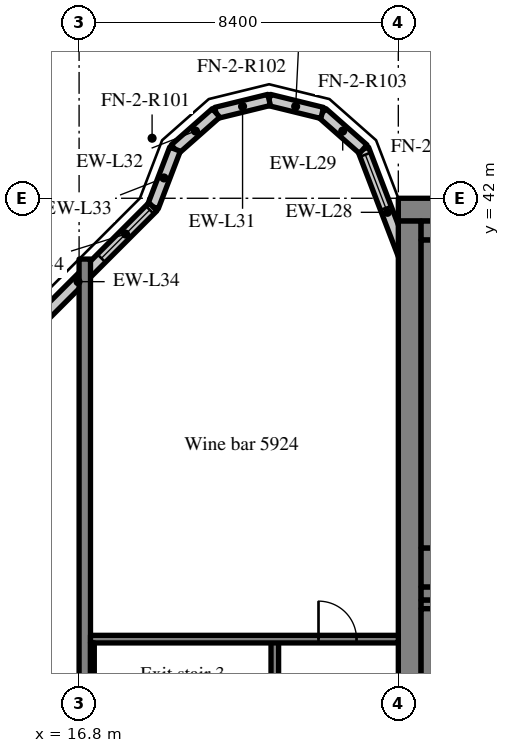
"""IFC4 building model, lengths in metres.
Left out: names, types, materials, properties, quantities, classifications, styles, units other than length and angle.
Written with IfcOpenShell. Run it as: python <this file> out.ifc"""

import sys

from ifc_helpers import new_model, si_unit, direction, frame, frame_2d, origin, place, context, subcontext, project, spatial, rectangle, extrude, source, transform, mapped, element, fill, save


model = new_model("IFC4")
c1 = context("Model", 3, precision=1e-05, world=origin(), true_north=direction((0.0, 1.0)))
c2 = subcontext(c1, "Body", "Model", "MODEL_VIEW")
j1 = project(units=[si_unit("LENGTHUNIT", "METRE"), si_unit("PLANEANGLEUNIT", "RADIAN")], contexts=[c1])
p1 = place(None, origin())
s1 = spatial("IfcSite", under=j1, at=p1, CompositionType="ELEMENT")
p2 = place(p1, origin())
s2 = spatial("IfcBuilding", under=s1, at=p2, CompositionType="ELEMENT")
p3 = place(p2, frame((0.0, 0.0, 245.2)))
s3 = spatial("IfcBuildingStorey", under=s2, at=p3, CompositionType="ELEMENT", Elevation=245.2)
m1 = source(origin(), c2, "Body", "SweptSolid", [
    extrude(rectangle(XDim=50.4, YDim=0.6, at=frame_2d((25.2, 0.0))), origin(), (0.0, 0.0, 1.0), 3.62),
])
p4 = place(p3, frame((25.2, 41.7, 0.0), z_axis=(0.0, 0.0, 1.0), x_axis=(1.0, 0.0, 0.0)))
e1 = element("IfcWall", 1, at=p4, inside=s3, PredefinedType="SHEAR", context=c2, shape_type="MappedRepresentation", body=[
    mapped(m1, transform((0.0, 0.0, 0.0), scale=1.0)),
])
m2 = source(origin(), c2, "Body", "SweptSolid", [
    extrude(rectangle(XDim=18.8, YDim=0.6, at=frame_2d((9.4, 0.0))), origin(), (0.0, 0.0, 1.0), 3.62),
])
p5 = place(p3, frame((25.5, 22.6, 0.0), z_axis=(0.0, 0.0, 1.0), x_axis=(0.0, 1.0, 0.0)))
e2 = element("IfcWall", 2, at=p5, inside=s3, PredefinedType="SHEAR", context=c2, shape_type="MappedRepresentation", body=[
    mapped(m2, transform((0.0, 0.0, 0.0), scale=1.0)),
])
m3 = source(origin(), c2, "Body", "SweptSolid", [
    extrude(rectangle(XDim=7.625, YDim=0.35, at=frame_2d((3.812, 0.0))), origin(), (0.0, 0.0, 1.0), 3.62),
])
p6 = place(p3, frame((25.8, 31.6, 0.0), z_axis=(0.0, 0.0, 1.0), x_axis=(1.0, 0.0, 0.0)))
e3 = element("IfcWall", 3, at=p6, inside=s3, PredefinedType="SHEAR", context=c2, shape_type="MappedRepresentation", body=[
    mapped(m3, transform((0.0, 0.0, 0.0), scale=1.0)),
])
m4 = source(origin(), c2, "Body", "SweptSolid", [
    extrude(rectangle(XDim=1.1, YDim=2.1, at=frame_2d((0.55, 1.05))), frame((0.0, 0.185, 0.0), z_axis=(0.0, -1.0, 0.0), x_axis=(1.0, 0.0, 0.0)), (0.0, 0.0, 1.0), 0.37),
])
p7 = place(p6, frame((5.938, 0.0, 0.0)))
e4 = element("IfcOpeningElement", 4, at=p7, cuts=e3, PredefinedType="OPENING", context=c2, shape_type="MappedRepresentation", body=[
    mapped(m4, transform((0.0, 0.0, 0.0), scale=1.0)),
])
m5 = source(origin(), c2, "Body", "SweptSolid", [
    extrude(rectangle(XDim=18.4, YDim=0.3, at=frame_2d((9.2, 0.0))), origin(), (0.0, 0.0, 1.0), 3.62),
])
p8 = place(p3, frame((16.95, 22.0, 0.0), z_axis=(0.0, 0.0, 1.0), x_axis=(0.0, 1.0, 0.0)))
e5 = element("IfcWall", 5, at=p8, inside=s3, PredefinedType="SHEAR", context=c2, shape_type="MappedRepresentation", body=[
    mapped(m5, transform((0.0, 0.0, 0.0), scale=1.0)),
])
m6 = source(origin(), c2, "Body", "SweptSolid", [
    extrude(rectangle(XDim=3.559, YDim=0.3, at=frame_2d((1.78, 0.0))), origin(), (0.0, 0.0, 1.0), 3.62),
])
p9 = place(p3, frame((25.55, 39.969, 0.0), z_axis=(0.0, 0.0, 1.0), x_axis=(-0.35779745313, 0.933799219604, 0.0)))
e6 = element("IfcWall", 6, at=p9, inside=s3, PredefinedType="SOLIDWALL", context=c2, shape_type="MappedRepresentation", body=[
    mapped(m6, transform((0.0, 0.0, 0.0), scale=1.0)),
])
m7 = source(origin(), c2, "Body", "SweptSolid", [
    extrude(rectangle(XDim=1.5, YDim=2.0, at=frame_2d((0.75, 1.0))), frame((0.0, 0.16, 0.0), z_axis=(0.0, -1.0, 0.0), x_axis=(1.0, 0.0, 0.0)), (0.0, 0.0, 1.0), 0.32),
])
p10 = place(p9, frame((1.903, 0.0, 0.9)))
e7 = element("IfcOpeningElement", 7, at=p10, cuts=e6, PredefinedType="OPENING", context=c2, shape_type="MappedRepresentation", body=[
    mapped(m7, transform((0.0, 0.0, 0.0), scale=1.0)),
])
m8 = source(origin(), c2, "Body", "SweptSolid", [
    extrude(rectangle(XDim=1.44, YDim=0.3, at=frame_2d((0.72, 0.0))), origin(), (0.0, 0.0, 1.0), 3.62),
])
p11 = place(p3, frame((24.277, 43.292, 0.0), z_axis=(0.0, 0.0, 1.0), x_axis=(-0.749649827867, 0.661834673902, 0.0)))
e8 = element("IfcWall", 8, at=p11, inside=s3, PredefinedType="SOLIDWALL", context=c2, shape_type="MappedRepresentation", body=[
    mapped(m8, transform((0.0, 0.0, 0.0), scale=1.0)),
])
m9 = source(origin(), c2, "Body", "SweptSolid", [
    extrude(rectangle(XDim=1.438, YDim=0.3, at=frame_2d((0.719, 0.0))), origin(), (0.0, 0.0, 1.0), 3.62),
])
p12 = place(p3, frame((23.197, 44.245, 0.0), z_axis=(0.0, 0.0, 1.0), x_axis=(-0.971152283879, 0.238460146601, 0.0)))
e9 = element("IfcWall", 9, at=p12, inside=s3, PredefinedType="SOLIDWALL", context=c2, shape_type="MappedRepresentation", body=[
    mapped(m9, transform((0.0, 0.0, 0.0), scale=1.0)),
])
m10 = source(origin(), c2, "Body", "SweptSolid", [
    extrude(rectangle(XDim=1.439, YDim=0.3, at=frame_2d((0.719, 0.0))), origin(), (0.0, 0.0, 1.0), 3.62),
])
p13 = place(p3, frame((21.8, 44.588, 0.0), z_axis=(0.0, 0.0, 1.0), x_axis=(-0.971161932466, -0.238420848351, 0.0)))
e10 = element("IfcWall", 10, at=p13, inside=s3, PredefinedType="SOLIDWALL", context=c2, shape_type="MappedRepresentation", body=[
    mapped(m10, transform((0.0, 0.0, 0.0), scale=1.0)),
])
m11 = source(origin(), c2, "Body", "SweptSolid", [
    extrude(rectangle(XDim=1.44, YDim=0.3, at=frame_2d((0.72, 0.0))), origin(), (0.0, 0.0, 1.0), 3.62),
])
p14 = place(p3, frame((20.403, 44.245, 0.0), z_axis=(0.0, 0.0, 1.0), x_axis=(-0.74957555648, -0.661918790432, 0.0)))
e11 = element("IfcWall", 11, at=p14, inside=s3, PredefinedType="SOLIDWALL", context=c2, shape_type="MappedRepresentation", body=[
    mapped(m11, transform((0.0, 0.0, 0.0), scale=1.0)),
])
m12 = source(origin(), c2, "Body", "SweptSolid", [
    extrude(rectangle(XDim=1.622, YDim=0.3, at=frame_2d((0.811, 0.0))), origin(), (0.0, 0.0, 1.0), 3.62),
])
p15 = place(p3, frame((19.323, 43.292, 0.0), z_axis=(0.0, 0.0, 1.0), x_axis=(-0.357778527068, -0.933806471154, 0.0)))
e12 = element("IfcWall", 12, at=p15, inside=s3, PredefinedType="SOLIDWALL", context=c2, shape_type="MappedRepresentation", body=[
    mapped(m12, transform((0.0, 0.0, 0.0), scale=1.0)),
])
m13 = source(origin(), c2, "Body", "SweptSolid", [
    extrude(rectangle(XDim=5.576, YDim=0.3, at=frame_2d((2.788, 0.0))), origin(), (0.0, 0.0, 1.0), 3.62),
])
p16 = place(p3, frame((18.743, 41.777, 0.0), z_axis=(0.0, 0.0, 1.0), x_axis=(-0.707106781187, -0.707106781187, 0.0)))
e13 = element("IfcWall", 13, at=p16, inside=s3, PredefinedType="SOLIDWALL", context=c2, shape_type="MappedRepresentation", body=[
    mapped(m13, transform((0.0, 0.0, 0.0), scale=1.0)),
])
m14 = source(origin(), c2, "Body", "SweptSolid", [
    extrude(rectangle(XDim=1.8, YDim=1.5, at=frame_2d((0.9, 0.75))), frame((0.0, 0.16, 0.0), z_axis=(0.0, -1.0, 0.0), x_axis=(1.0, 0.0, 0.0)), (0.0, 0.0, 1.0), 0.32),
])
p17 = place(p16, frame((0.118, 0.0, 0.9)))
e14 = element("IfcOpeningElement", 14, at=p17, cuts=e13, PredefinedType="OPENING", context=c2, shape_type="MappedRepresentation", body=[
    mapped(m14, transform((0.0, 0.0, 0.0), scale=1.0)),
])
m15 = source(origin(), c2, "Body", "SweptSolid", [
    extrude(rectangle(XDim=8.3, YDim=0.2, at=frame_2d((4.15, 0.0))), origin(), (0.0, 0.0, 1.0), 3.62),
])
p18 = place(p3, frame((21.95, 22.1, 0.0), z_axis=(0.0, 0.0, 1.0), x_axis=(0.0, 1.0, 0.0)))
e15 = element("IfcWall", 15, at=p18, inside=s3, PredefinedType="SOLIDWALL", context=c2, shape_type="MappedRepresentation", body=[
    mapped(m15, transform((0.0, 0.0, 0.0), scale=1.0)),
])
m16 = source(origin(), c2, "Body", "SweptSolid", [
    extrude(rectangle(XDim=1.2, YDim=2.1, at=frame_2d((0.6, 1.05))), frame((0.0, 0.11, 0.0), z_axis=(0.0, -1.0, 0.0), x_axis=(1.0, 0.0, 0.0)), (0.0, 0.0, 1.0), 0.22),
])
p19 = place(p18, frame((0.6, 0.0, 0.0)))
e16 = element("IfcOpeningElement", 16, at=p19, cuts=e15, PredefinedType="OPENING", context=c2, shape_type="MappedRepresentation", body=[
    mapped(m16, transform((0.0, 0.0, 0.0), scale=1.0)),
])
m17 = source(origin(), c2, "Body", "SweptSolid", [
    extrude(rectangle(XDim=8.1, YDim=0.2, at=frame_2d((4.05, 0.0))), origin(), (0.0, 0.0, 1.0), 3.62),
])
p20 = place(p3, frame((17.1, 30.4, 0.0), z_axis=(0.0, 0.0, 1.0), x_axis=(1.0, 0.0, 0.0)))
e17 = element("IfcWall", 17, at=p20, inside=s3, PredefinedType="SOLIDWALL", context=c2, shape_type="MappedRepresentation", body=[
    mapped(m17, transform((0.0, 0.0, 0.0), scale=1.0)),
])
m18 = source(origin(), c2, "Body", "SweptSolid", [
    extrude(rectangle(XDim=1.0, YDim=2.1, at=frame_2d((0.5, 1.05))), frame((0.0, 0.11, 0.0), z_axis=(0.0, -1.0, 0.0), x_axis=(1.0, 0.0, 0.0)), (0.0, 0.0, 1.0), 0.22),
])
p21 = place(p20, frame((6.0, 0.0, 0.0)))
e18 = element("IfcOpeningElement", 18, at=p21, cuts=e17, PredefinedType="OPENING", context=c2, shape_type="MappedRepresentation", body=[
    mapped(m18, transform((0.0, 0.0, 0.0), scale=1.0)),
])
m19 = source(origin(), c2, "Body", "SweptSolid", [
    extrude(rectangle(XDim=5.15, YDim=0.225, at=frame_2d((2.575, 0.0))), origin(), (0.0, 0.0, 1.0), 3.62),
])
p22 = place(p3, frame((25.8, 31.312, 0.0), z_axis=(0.0, 0.0, 1.0), x_axis=(1.0, 0.0, 0.0)))
e19 = element("IfcWall", 19, at=p22, inside=s3, PredefinedType="SOLIDWALL", context=c2, shape_type="MappedRepresentation", body=[
    mapped(m19, transform((0.0, 0.0, 0.0), scale=1.0)),
])
m20 = source(origin(), c2, "Body", "SweptSolid", [
    extrude(rectangle(XDim=8.1, YDim=0.5, at=frame_2d((4.05, 0.0))), origin(), (0.0, 0.0, 1.0), 3.62),
])
p23 = place(p3, frame((26.05, 23.1, 0.0), z_axis=(0.0, 0.0, 1.0), x_axis=(0.0, 1.0, 0.0)))
e20 = element("IfcWall", 20, at=p23, inside=s3, PredefinedType="SOLIDWALL", context=c2, shape_type="MappedRepresentation", body=[
    mapped(m20, transform((0.0, 0.0, 0.0), scale=1.0)),
])
m21 = source(origin(), c2, "Body", "SweptSolid", [
    extrude(rectangle(XDim=8.1, YDim=0.1, at=frame_2d((4.05, 0.0))), origin(), (0.0, 0.0, 1.0), 3.62),
])
p24 = place(p3, frame((17.15, 22.2, 0.0), z_axis=(0.0, 0.0, 1.0), x_axis=(0.0, 1.0, 0.0)))
e21 = element("IfcWall", 21, at=p24, inside=s3, PredefinedType="SOLIDWALL", context=c2, shape_type="MappedRepresentation", body=[
    mapped(m21, transform((0.0, 0.0, 0.0), scale=1.0)),
])
m22 = source(origin(), c2, "Body", "SweptSolid", [
    extrude(rectangle(XDim=5.15, YDim=0.5, at=frame_2d((2.575, 0.0))), origin(), (0.0, 0.0, 1.0), 3.62),
])
p25 = place(p3, frame((25.8, 41.15, 0.0), z_axis=(0.0, 0.0, 1.0), x_axis=(1.0, 0.0, 0.0)))
e22 = element("IfcWall", 22, at=p25, inside=s3, PredefinedType="SOLIDWALL", context=c2, shape_type="MappedRepresentation", body=[
    mapped(m22, transform((0.0, 0.0, 0.0), scale=1.0)),
])
m23 = source(origin(), c2, "Body", "SweptSolid", [
    extrude(rectangle(XDim=5.15, YDim=1.025, at=frame_2d((2.575, 0.0))), origin(), (0.0, 0.0, 1.0), 3.62),
])
p26 = place(p3, frame((25.8, 32.287, 0.0), z_axis=(0.0, 0.0, 1.0), x_axis=(1.0, 0.0, 0.0)))
e23 = element("IfcWall", 23, at=p26, inside=s3, PredefinedType="SOLIDWALL", context=c2, shape_type="MappedRepresentation", body=[
    mapped(m23, transform((0.0, 0.0, 0.0), scale=1.0)),
])
p27 = place(p3, frame((26.05, 32.8, 0.0), z_axis=(0.0, 0.0, 1.0), x_axis=(0.0, 1.0, 0.0)))
e24 = element("IfcWall", 24, at=p27, inside=s3, PredefinedType="SOLIDWALL", context=c2, shape_type="MappedRepresentation", body=[
    mapped(m20, transform((0.0, 0.0, 0.0), scale=1.0)),
])
m24 = source(origin(), c2, "Body", "SweptSolid", [
    extrude(rectangle(XDim=1.5, YDim=2.0, at=frame_2d((0.75, 1.0))), frame((0.0, 0.03, 0.0), z_axis=(0.0, -1.0, 0.0), x_axis=(1.0, 0.0, 0.0)), (0.0, 0.0, 1.0), 0.06),
])
p28 = place(p10, origin())
e25 = element("IfcWindow", 25, at=p28, inside=s3, PartitioningType="SINGLE_PANEL", PredefinedType="WINDOW", context=c2, shape_type="MappedRepresentation", body=[
    mapped(m24, transform((0.0, 0.0, 0.0), scale=1.0)),
])
fill(e7, e25)
m25 = source(origin(), c2, "Body", "SweptSolid", [
    extrude(rectangle(XDim=1.8, YDim=1.5, at=frame_2d((0.9, 0.75))), frame((0.0, 0.03, 0.0), z_axis=(0.0, -1.0, 0.0), x_axis=(1.0, 0.0, 0.0)), (0.0, 0.0, 1.0), 0.06),
])
p29 = place(p17, origin())
e26 = element("IfcWindow", 26, at=p29, inside=s3, PartitioningType="SINGLE_PANEL", PredefinedType="WINDOW", context=c2, shape_type="MappedRepresentation", body=[
    mapped(m25, transform((0.0, 0.0, 0.0), scale=1.0)),
])
fill(e14, e26)
m26 = source(origin(), c2, "Body", "SweptSolid", [
    extrude(rectangle(XDim=1.0, YDim=2.1, at=frame_2d((0.5, 1.05))), frame((0.0, 0.025, 0.0), z_axis=(0.0, -1.0, 0.0), x_axis=(1.0, 0.0, 0.0)), (0.0, 0.0, 1.0), 0.05),
])
p30 = place(p21, origin())
e27 = element("IfcDoor", 27, at=p30, inside=s3, OperationType="SINGLE_SWING_LEFT", PredefinedType="DOOR", context=c2, shape_type="MappedRepresentation", body=[
    mapped(m26, transform((0.0, 0.0, 0.0), scale=1.0)),
])
fill(e18, e27)
save(model, sys.argv[1])
